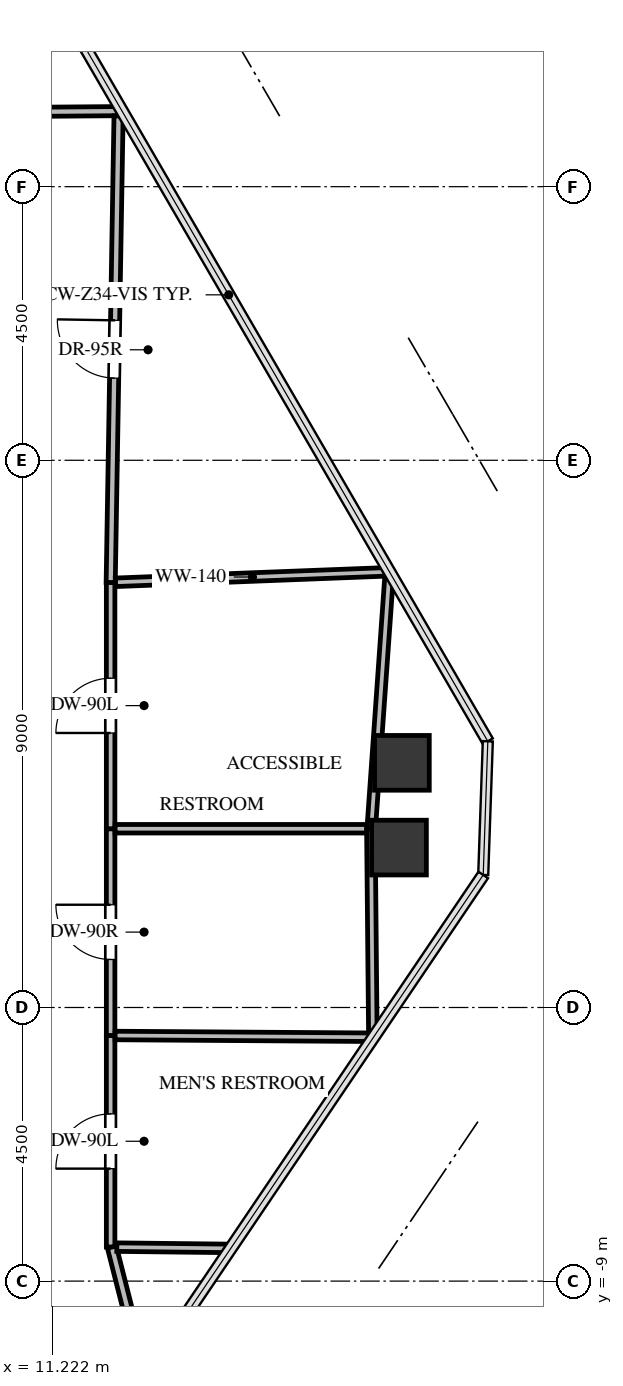
"""IFC4 building model, lengths in metres.
Left out: names, types, materials, properties, quantities, classifications, styles, units other than length and angle.
Written with IfcOpenShell. Run it as: python <this file> out.ifc"""

import sys

from ifc_helpers import new_model, si_unit, direction, frame, frame_2d, origin, origin_2d, place, context, subcontext, project, spatial, rectangle, extrude, source, transform, mapped, element, fill, save


model = new_model("IFC4")
c1 = context("Model", 3, precision=1e-05, world=origin(), true_north=direction((0.0, 1.0)))
c2 = subcontext(c1, "Body", "Model", "MODEL_VIEW")
j1 = project(units=[si_unit("LENGTHUNIT", "METRE"), si_unit("PLANEANGLEUNIT", "RADIAN")], contexts=[c1])
p1 = place(None, origin())
s1 = spatial("IfcSite", under=j1, at=p1, CompositionType="ELEMENT")
p2 = place(p1, origin())
s2 = spatial("IfcBuilding", under=s1, at=p2, CompositionType="ELEMENT")
p3 = place(p2, frame((0.0, 0.0, 234.8)))
s3 = spatial("IfcBuildingStorey", under=s2, at=p3, CompositionType="ELEMENT", Elevation=234.8)
m1 = source(origin(), c2, "Body", "SweptSolid", [
    extrude(rectangle(XDim=0.9, YDim=0.9, at=origin_2d()), origin(), (0.0, 0.0, 1.0), 3.3),
])
for number, where, z_axis, x_axis in (
    (1, (16.97, -0.476, -0.24), (0.0, 0.0, 1.0), (1.0, 0.0, 0.0)),
    (2, (16.922, -1.87, -0.24), (0.0, 0.0, 1.0), (1.0, 0.0, 0.0)),
):
    element("IfcColumn", number, at=place(p3, frame(where, z_axis=z_axis, x_axis=x_axis)), inside=s3, PredefinedType="COLUMN", context=c2, shape_type="MappedRepresentation", body=[
        mapped(m1, transform((0.0, 0.0, 0.0), x_axis=(1.0, 0.0, 0.0), y_axis=(0.0, 1.0, 0.0), z_axis=(0.0, 0.0, 1.0), scale=1.0)),
    ])
p4 = place(p3, frame((12.18, -8.44, 0.0), z_axis=(0.0, 0.0, 1.0), x_axis=(0.0, 1.0, 0.0)))
e3 = element("IfcWall", 3, at=p4, inside=s3, PredefinedType="PARTITIONING", context=c2, shape_type="SweptSolid", body=[
    extrude(rectangle(XDim=3.48, YDim=0.14, at=frame_2d((1.74, 0.0))), origin(), (0.0, 0.0, 1.0), 2.399),
])
p5 = place(p4, frame((1.29, 0.0, 0.0)))
e4 = element("IfcOpeningElement", 4, at=p5, cuts=e3, PredefinedType="OPENING", context=c2, shape_type="SweptSolid", body=[
    extrude(rectangle(XDim=0.9, YDim=2.05, at=frame_2d((0.45, 1.025))), frame((0.0, 0.08, 0.0), z_axis=(0.0, -1.0, 0.0), x_axis=(1.0, 0.0, 0.0)), (0.0, 0.0, 1.0), 0.16),
])
p6 = place(p3, frame((12.18, -4.96, 0.0), z_axis=(0.0, 0.0, 1.0), x_axis=(0.0, 1.0, 0.0)))
e5 = element("IfcWall", 5, at=p6, inside=s3, PredefinedType="PARTITIONING", context=c2, shape_type="SweptSolid", body=[
    extrude(rectangle(XDim=3.4, YDim=0.14, at=frame_2d((1.7, 0.0))), origin(), (0.0, 0.0, 1.0), 3.045),
])
p7 = place(p6, frame((1.25, 0.0, 0.0)))
e6 = element("IfcOpeningElement", 6, at=p7, cuts=e5, PredefinedType="OPENING", context=c2, shape_type="SweptSolid", body=[
    extrude(rectangle(XDim=0.9, YDim=2.05, at=frame_2d((0.45, 1.025))), frame((0.0, 0.08, 0.0), z_axis=(0.0, -1.0, 0.0), x_axis=(1.0, 0.0, 0.0)), (0.0, 0.0, 1.0), 0.16),
])
p8 = place(p3, frame((12.18, -1.56, 0.0), z_axis=(0.0, 0.0, 1.0), x_axis=(0.0, 1.0, 0.0)))
e7 = element("IfcWall", 7, at=p8, inside=s3, PredefinedType="PARTITIONING", context=c2, shape_type="SweptSolid", body=[
    extrude(rectangle(XDim=4.05, YDim=0.14, at=frame_2d((2.025, 0.0))), origin(), (0.0, 0.0, 1.0), 2.301),
])
p9 = place(p8, frame((1.575, 0.0, 0.0)))
e8 = element("IfcOpeningElement", 8, at=p9, cuts=e7, PredefinedType="OPENING", context=c2, shape_type="SweptSolid", body=[
    extrude(rectangle(XDim=0.9, YDim=2.05, at=frame_2d((0.45, 1.025))), frame((0.0, 0.08, 0.0), z_axis=(0.0, -1.0, 0.0), x_axis=(1.0, 0.0, 0.0)), (0.0, 0.0, 1.0), 0.16),
])
p10 = place(p3, frame((12.368, 10.243, 0.0), z_axis=(0.0, 0.0, 1.0), x_axis=(-0.999968379606, -0.007952344825, 0.0)))
e9 = element("IfcWall", 9, at=p10, inside=s3, PredefinedType="PARTITIONING", context=c2, shape_type="SweptSolid", body=[
    extrude(rectangle(XDim=7.829, YDim=0.15, at=frame_2d((3.914, 0.0))), origin(), (0.0, 0.0, 1.0), 2.301),
])
p11 = place(p10, frame((3.439, 0.0, 0.0)))
e10 = element("IfcOpeningElement", 10, at=p11, cuts=e9, PredefinedType="OPENING", context=c2, shape_type="SweptSolid", body=[
    extrude(rectangle(XDim=0.95, YDim=2.1, at=frame_2d((0.475, 1.05))), frame((0.0, 0.085, 0.0), z_axis=(0.0, -1.0, 0.0), x_axis=(1.0, 0.0, 0.0)), (0.0, 0.0, 1.0), 0.17),
])
p12 = place(p3, frame((12.719, -10.478, 0.0), z_axis=(0.0, 0.0, 1.0), x_axis=(-0.246522636262, 0.969137033556, 0.0)))
e11 = element("IfcWall", 11, at=p12, inside=s3, PredefinedType="PARTITIONING", context=c2, shape_type="SweptSolid", body=[
    extrude(rectangle(XDim=2.103, YDim=0.15, at=frame_2d((1.051, 0.0))), origin(), (0.0, 0.0, 1.0), 2.399),
])
p13 = place(p3, frame((12.181, 2.49, 0.0), z_axis=(0.0, 0.0, 1.0), x_axis=(0.016828669653, 0.999858387912, 0.0)))
e12 = element("IfcWall", 12, at=p13, inside=s3, PredefinedType="PARTITIONING", context=c2, shape_type="SweptSolid", body=[
    extrude(rectangle(XDim=7.674, YDim=0.15, at=frame_2d((3.837, 0.0))), origin(), (0.0, 0.0, 1.0), 2.399),
])
p14 = place(p13, frame((3.362, 0.0, 0.0)))
e13 = element("IfcOpeningElement", 13, at=p14, cuts=e12, PredefinedType="OPENING", context=c2, shape_type="SweptSolid", body=[
    extrude(rectangle(XDim=0.95, YDim=2.1, at=frame_2d((0.475, 1.05))), frame((0.0, 0.085, 0.0), z_axis=(0.0, -1.0, 0.0), x_axis=(1.0, 0.0, 0.0)), (0.0, 0.0, 1.0), 0.17),
])
p15 = place(p3, frame((12.254, -4.96, 0.0), z_axis=(0.0, 0.0, 1.0), x_axis=(0.999976630429, -0.006836563198, 0.0)))
e14 = element("IfcWall", 14, at=p15, inside=s3, PredefinedType="PARTITIONING", context=c2, shape_type="SweptSolid", body=[
    extrude(rectangle(XDim=4.25, YDim=0.14, at=frame_2d((2.125, 0.0))), origin(), (0.0, 0.0, 1.0), 2.399),
])
p16 = place(p3, frame((14.156, -8.462, 0.0), z_axis=(0.0, 0.0, 1.0), x_axis=(-0.999935742613, 0.011336253532, 0.0)))
e15 = element("IfcWall", 15, at=p16, inside=s3, PredefinedType="PARTITIONING", context=c2, shape_type="SweptSolid", body=[
    extrude(rectangle(XDim=1.874, YDim=0.14, at=frame_2d((0.937, 0.0))), origin(), (0.0, 0.0, 1.0), 2.399),
])
p17 = place(p3, frame((12.254, -1.56, 0.0), z_axis=(0.0, 0.0, 1.0), x_axis=(1.0, 0.0, 0.0)))
e16 = element("IfcWall", 16, at=p17, inside=s3, PredefinedType="PARTITIONING", context=c2, shape_type="SweptSolid", body=[
    extrude(rectangle(XDim=4.206, YDim=0.14, at=frame_2d((2.103, 0.0))), origin(), (0.0, 0.0, 1.0), 2.301),
])
p18 = place(p3, frame((16.46, -1.56, 0.0), z_axis=(0.0, 0.0, 1.0), x_axis=(0.009604446748, -0.999953876238, 0.0)))
e17 = element("IfcWall", 17, at=p18, inside=s3, PredefinedType="PARTITIONING", context=c2, shape_type="SweptSolid", body=[
    extrude(rectangle(XDim=3.355, YDim=0.14, at=frame_2d((1.678, 0.0))), origin(), (0.0, 0.0, 1.0), 2.301),
])
p19 = place(p3, frame((12.26, 2.493, 0.0), z_axis=(0.0, 0.0, 1.0), x_axis=(0.999256206289, 0.038562082324, 0.0)))
e18 = element("IfcWall", 18, at=p19, inside=s3, PredefinedType="PARTITIONING", context=c2, shape_type="SweptSolid", body=[
    extrude(rectangle(XDim=4.508, YDim=0.14, at=frame_2d((2.254, 0.0))), origin(), (0.0, 0.0, 1.0), 2.399),
])
p20 = place(p3, frame((16.76, 2.593, 0.0), z_axis=(0.0, 0.0, 1.0), x_axis=(-0.07055102187, -0.997508172053, 0.0)))
e19 = element("IfcWall", 19, at=p20, inside=s3, PredefinedType="PARTITIONING", context=c2, shape_type="SweptSolid", body=[
    extrude(rectangle(XDim=4.163, YDim=0.14, at=frame_2d((2.082, 0.0))), origin(), (0.0, 0.0, 1.0), 2.301),
])
m2 = source(origin(), c2, "Body", "SweptSolid", [
    extrude(rectangle(XDim=0.9, YDim=2.05, at=frame_2d((0.45, 1.025))), frame((0.0, 0.025, 0.0), z_axis=(0.0, -1.0, 0.0), x_axis=(1.0, 0.0, 0.0)), (0.0, 0.0, 1.0), 0.05),
])
p21 = place(p5, origin())
e20 = element("IfcDoor", 20, at=p21, inside=s3, OperationType="SINGLE_SWING_LEFT", PredefinedType="DOOR", context=c2, shape_type="MappedRepresentation", body=[
    mapped(m2, transform((0.0, 0.0, 0.0), x_axis=(1.0, 0.0, 0.0), y_axis=(0.0, 1.0, 0.0), z_axis=(0.0, 0.0, 1.0), scale=1.0)),
])
fill(e4, e20)
m3 = source(origin(), c2, "Body", "SweptSolid", [
    extrude(rectangle(XDim=0.9, YDim=2.05, at=frame_2d((0.45, 1.025))), frame((0.0, 0.025, 0.0), z_axis=(0.0, -1.0, 0.0), x_axis=(1.0, 0.0, 0.0)), (0.0, 0.0, 1.0), 0.05),
])
p22 = place(p7, origin())
e21 = element("IfcDoor", 21, at=p22, inside=s3, OperationType="SINGLE_SWING_RIGHT", PredefinedType="DOOR", context=c2, shape_type="MappedRepresentation", body=[
    mapped(m3, transform((0.0, 0.0, 0.0), x_axis=(1.0, 0.0, 0.0), y_axis=(0.0, 1.0, 0.0), z_axis=(0.0, 0.0, 1.0), scale=1.0)),
])
fill(e6, e21)
p23 = place(p9, origin())
e22 = element("IfcDoor", 22, at=p23, inside=s3, OperationType="SINGLE_SWING_LEFT", PredefinedType="DOOR", context=c2, shape_type="MappedRepresentation", body=[
    mapped(m2, transform((0.0, 0.0, 0.0), x_axis=(1.0, 0.0, 0.0), y_axis=(0.0, 1.0, 0.0), z_axis=(0.0, 0.0, 1.0), scale=1.0)),
])
fill(e8, e22)
m4 = source(origin(), c2, "Body", "SweptSolid", [
    extrude(rectangle(XDim=0.95, YDim=2.1, at=frame_2d((0.475, 1.05))), frame((0.0, 0.025, 0.0), z_axis=(0.0, -1.0, 0.0), x_axis=(1.0, 0.0, 0.0)), (0.0, 0.0, 1.0), 0.05),
])
p24 = place(p14, origin())
e23 = element("IfcDoor", 23, at=p24, inside=s3, OperationType="SINGLE_SWING_RIGHT", PredefinedType="DOOR", context=c2, shape_type="MappedRepresentation", body=[
    mapped(m4, transform((0.0, 0.0, 0.0), x_axis=(1.0, 0.0, 0.0), y_axis=(0.0, 1.0, 0.0), z_axis=(0.0, 0.0, 1.0), scale=1.0)),
])
fill(e13, e23)
save(model, sys.argv[1])
